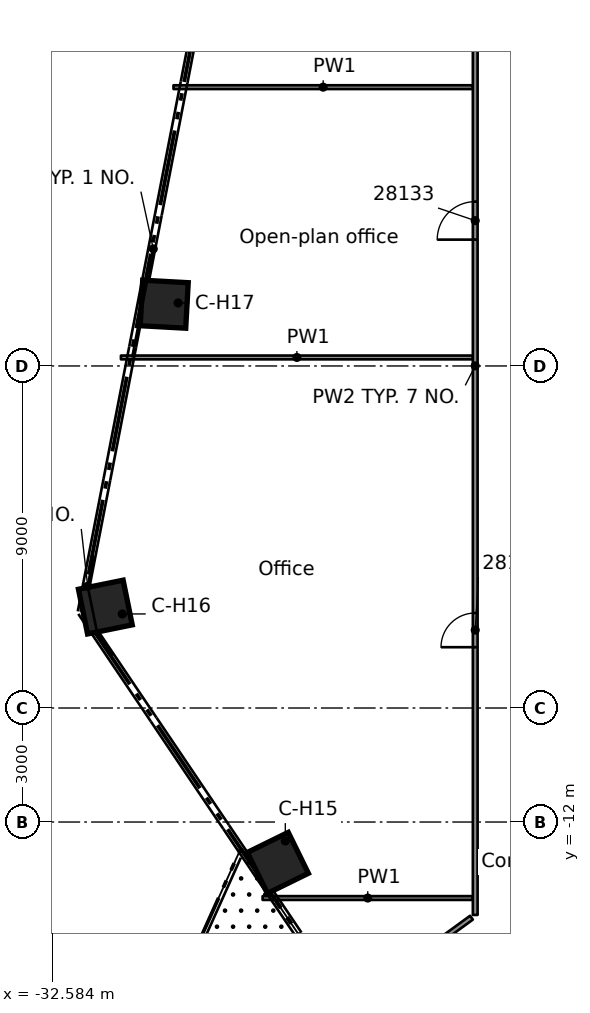
"""IFC4 building model, lengths in metres.
Left out: names, types, materials, properties, quantities, classifications, styles, units other than length and angle.
Written with IfcOpenShell. Run it as: python <this file> out.ifc"""

import sys

from ifc_helpers import new_model, si_unit, direction, frame, frame_2d, origin, origin_2d, place, context, subcontext, project, spatial, rectangle, extrude, element, fill, save


model = new_model("IFC4")
c1 = context("Model", 3, precision=1e-05, world=origin(), true_north=direction((0.0, 1.0)))
c2 = subcontext(c1, "Body", "Model", "MODEL_VIEW")
j1 = project(units=[si_unit("LENGTHUNIT", "METRE"), si_unit("PLANEANGLEUNIT", "RADIAN")], contexts=[c1])
p1 = place(None, origin())
s1 = spatial("IfcSite", under=j1, at=p1, CompositionType="ELEMENT")
p2 = place(p1, origin())
s2 = spatial("IfcBuilding", under=s1, at=p2, CompositionType="ELEMENT")
p3 = place(p2, frame((0.0, 0.0, 145.6)))
s3 = spatial("IfcBuildingStorey", under=s2, at=p3, CompositionType="ELEMENT", Elevation=145.6)
for number, where, z_axis, x_axis in (
    (1, (-26.644, -13.075, 0.0), (0.0, 0.0, 1.0), (-0.898, -0.441, 0.0)),
    (2, (-31.183, -6.344, 0.0), (0.0, 0.0, 1.0), (-0.98, -0.199, 0.0)),
    (3, (-29.634, 1.625, 0.0), (0.0, 0.0, 1.0), (-0.998, 0.055, 0.0)),
):
    element("IfcColumn", number, at=place(p3, frame(where, z_axis=z_axis, x_axis=x_axis)), inside=s3, PredefinedType="COLUMN", context=c2, shape_type="SweptSolid", body=[
        extrude(rectangle(XDim=1.2, YDim=1.2, at=origin_2d()), origin(), (0.0, 0.0, 1.0), 3.5),
    ])
p4 = place(p3, frame((-27.045, -14.0, 0.0), z_axis=(0.0, 0.0, 1.0), x_axis=(1.0, 0.0, 0.0)))
e4 = element("IfcWall", 4, at=p4, inside=s3, PredefinedType="PARTITIONING", context=c2, shape_type="SweptSolid", body=[
    extrude(rectangle(XDim=5.533, YDim=0.1, at=frame_2d((2.767, 0.0))), origin(), (0.0, 0.0, 1.0), 3.08),
])
p5 = place(p3, frame((-30.773, 0.224, 0.0), z_axis=(0.0, 0.0, 1.0), x_axis=(1.0, 0.0, 0.0)))
e5 = element("IfcWall", 5, at=p5, inside=s3, PredefinedType="PARTITIONING", context=c2, shape_type="SweptSolid", body=[
    extrude(rectangle(XDim=9.261, YDim=0.1, at=frame_2d((4.63, 0.0))), origin(), (0.0, 0.0, 1.0), 3.08),
])
p6 = place(p3, frame((-29.39, 7.336, 0.0), z_axis=(0.0, 0.0, 1.0), x_axis=(1.0, 0.0, 0.0)))
e6 = element("IfcWall", 6, at=p6, inside=s3, PredefinedType="PARTITIONING", context=c2, shape_type="SweptSolid", body=[
    extrude(rectangle(XDim=7.878, YDim=0.1, at=frame_2d((3.939, 0.0))), origin(), (0.0, 0.0, 1.0), 3.08),
])
p7 = place(p3, frame((-22.43, -15.159, 0.0), z_axis=(0.0, 0.0, 1.0), x_axis=(0.808202988532, 0.588904006888, 0.0)))
e7 = element("IfcWall", 7, at=p7, inside=s3, PredefinedType="PARTITIONING", context=c2, shape_type="SweptSolid", body=[
    extrude(rectangle(XDim=1.09, YDim=0.125, at=frame_2d((0.545, 0.0))), origin(), (0.0, 0.0, 1.0), 3.08),
])
p8 = place(p3, frame((-21.45, -14.445, 0.0), z_axis=(0.0, 0.0, 1.0), x_axis=(0.0, 1.0, 0.0)))
e8 = element("IfcWall", 8, at=p8, inside=s3, PredefinedType="PARTITIONING", context=c2, shape_type="SweptSolid", body=[
    extrude(rectangle(XDim=28.896, YDim=0.125, at=frame_2d((14.448, 0.0))), origin(), (0.0, 0.0, 1.0), 3.08),
])
p9 = place(p8, frame((7.045, 0.0, 0.0)))
e9 = element("IfcOpeningElement", 9, at=p9, cuts=e8, PredefinedType="OPENING", context=c2, shape_type="SweptSolid", body=[
    extrude(rectangle(XDim=0.9, YDim=2.1, at=frame_2d((0.45, 1.05))), frame((0.0, 0.073, 0.0), z_axis=(0.0, -1.0, 0.0), x_axis=(1.0, 0.0, 0.0)), (0.0, 0.0, 1.0), 0.145),
])
p10 = place(p8, frame((17.769, 0.0, 0.0)))
e10 = element("IfcOpeningElement", 10, at=p10, cuts=e8, PredefinedType="OPENING", context=c2, shape_type="SweptSolid", body=[
    extrude(rectangle(XDim=1.0, YDim=2.1, at=frame_2d((0.5, 1.05))), frame((0.0, 0.073, 0.0), z_axis=(0.0, -1.0, 0.0), x_axis=(1.0, 0.0, 0.0)), (0.0, 0.0, 1.0), 0.145),
])
p11 = place(p9, origin())
e11 = element("IfcDoor", 11, at=p11, inside=s3, OperationType="SINGLE_SWING_LEFT", PredefinedType="DOOR", context=c2, shape_type="SweptSolid", body=[
    extrude(rectangle(XDim=0.9, YDim=2.1, at=frame_2d((0.45, 1.05))), frame((0.0, 0.025, 0.0), z_axis=(0.0, -1.0, 0.0), x_axis=(1.0, 0.0, 0.0)), (0.0, 0.0, 1.0), 0.05),
])
fill(e9, e11)
p12 = place(p10, origin())
e12 = element("IfcDoor", 12, at=p12, inside=s3, OperationType="SINGLE_SWING_RIGHT", PredefinedType="DOOR", context=c2, shape_type="SweptSolid", body=[
    extrude(rectangle(XDim=1.0, YDim=2.1, at=frame_2d((0.5, 1.05))), frame((0.0, 0.025, 0.0), z_axis=(0.0, -1.0, 0.0), x_axis=(1.0, 0.0, 0.0)), (0.0, 0.0, 1.0), 0.05),
])
fill(e10, e12)
save(model, sys.argv[1])
